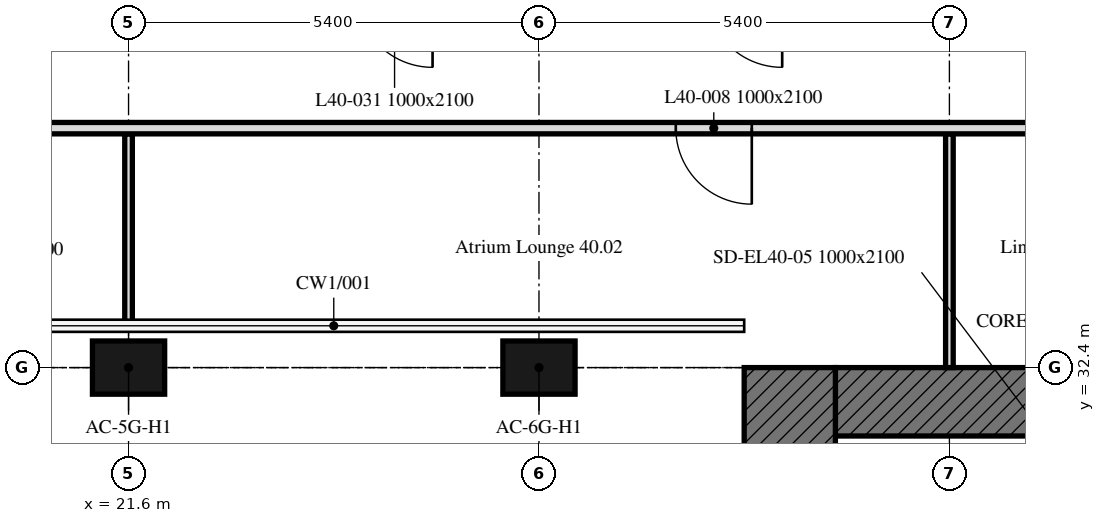
"""IFC4 building model, lengths in metres.
Left out: names, types, materials, properties, quantities, classifications, styles, units other than length and angle.
Written with IfcOpenShell. Run it as: python <this file> out.ifc"""

import sys

from ifc_helpers import new_model, si_unit, direction, frame, frame_2d, origin, origin_2d, place, context, subcontext, project, spatial, rectangle, extrude, element, fill, save


model = new_model("IFC4")
c1 = context("Model", 3, precision=1e-05, world=origin(), true_north=direction((0.0, 1.0)))
c2 = subcontext(c1, "Body", "Model", "MODEL_VIEW")
j1 = project(units=[si_unit("LENGTHUNIT", "METRE"), si_unit("PLANEANGLEUNIT", "RADIAN")], contexts=[c1])
p1 = place(None, origin())
s1 = spatial("IfcSite", under=j1, at=p1, CompositionType="ELEMENT")
p2 = place(p1, origin())
s2 = spatial("IfcBuilding", under=s1, at=p2, CompositionType="ELEMENT")
p3 = place(p2, frame((0.0, 0.0, 169.3)))
s3 = spatial("IfcBuildingStorey", under=s2, at=p3, CompositionType="ELEMENT", Elevation=169.3)
for number, where, z_axis, x_axis in (
    (1, (21.6, 32.4, 0.0), (0.0, 0.0, 1.0), (1.0, 0.0, 0.0)),
    (2, (27.0, 32.4, 0.0), (0.0, 0.0, 1.0), (1.0, 0.0, 0.0)),
):
    element("IfcColumn", number, at=place(p3, frame(where, z_axis=z_axis, x_axis=x_axis)), inside=s3, PredefinedType="COLUMN", context=c2, shape_type="SweptSolid", body=[
        extrude(rectangle(XDim=0.95, YDim=0.7, at=origin_2d()), origin(), (0.0, 0.0, 1.0), 3.0),
    ])
p4 = place(p3, frame((30.9, 31.95, 0.0), z_axis=(0.0, 0.0, 1.0), x_axis=(1.0, 0.0, 0.0)))
e3 = element("IfcWall", 3, at=p4, inside=s3, PredefinedType="SOLIDWALL", context=c2, shape_type="SweptSolid", body=[
    extrude(rectangle(XDim=11.1, YDim=0.9, at=frame_2d((5.55, 0.0))), origin(), (0.0, 0.0, 1.0), 3.0),
])
p5 = place(p4, frame((5.55, 0.0, 0.0)))
e4 = element("IfcOpeningElement", 4, at=p5, cuts=e3, PredefinedType="OPENING", context=c2, shape_type="SweptSolid", body=[
    extrude(rectangle(XDim=2.0, YDim=2.4, at=frame_2d((1.0, 1.2))), frame((0.0, 0.45, 0.0), z_axis=(0.0, -1.0, 0.0), x_axis=(1.0, 0.0, 0.0)), (0.0, 0.0, 1.0), 0.9),
])
p6 = place(p3, frame((30.3, 16.2, 0.0), z_axis=(0.0, 0.0, 1.0), x_axis=(0.0, 1.0, 0.0)))
e5 = element("IfcWall", 5, at=p6, inside=s3, PredefinedType="SOLIDWALL", context=c2, shape_type="SweptSolid", body=[
    extrude(rectangle(XDim=16.2, YDim=1.2, at=frame_2d((8.1, 0.0))), origin(), (0.0, 0.0, 1.0), 3.0),
])
p7 = place(p3, frame((21.6, 32.895, 0.0), z_axis=(0.0, 0.0, 1.0), x_axis=(0.0, 1.0, 0.0)))
e6 = element("IfcWall", 6, at=p7, inside=s3, PredefinedType="PARTITIONING", context=c2, shape_type="SweptSolid", body=[
    extrude(rectangle(XDim=2.58, YDim=0.1, at=frame_2d((1.29, 0.0))), origin(), (0.0, 0.0, 1.0), 3.0),
])
p8 = place(p3, frame((32.4, 32.4, 0.0), z_axis=(0.0, 0.0, 1.0), x_axis=(0.0, 1.0, 0.0)))
e7 = element("IfcWall", 7, at=p8, inside=s3, PredefinedType="PARTITIONING", context=c2, shape_type="SweptSolid", body=[
    extrude(rectangle(XDim=3.075, YDim=0.1, at=frame_2d((1.538, 0.0))), origin(), (0.0, 0.0, 1.0), 3.0),
])
p9 = place(p3, frame((43.275, 35.55, 0.0), z_axis=(0.0, 0.0, 1.0), x_axis=(-1.0, 0.0, 0.0)))
e8 = element("IfcWall", 8, at=p9, inside=s3, PredefinedType="PARTITIONING", context=c2, shape_type="SweptSolid", body=[
    extrude(rectangle(XDim=33.825, YDim=0.15, at=frame_2d((16.913, 0.0))), origin(), (0.0, 0.0, 1.0), 3.0),
])
p10 = place(p9, frame((23.875, 0.0, 0.0)))
e9 = element("IfcOpeningElement", 9, at=p10, cuts=e8, PredefinedType="OPENING", context=c2, shape_type="SweptSolid", body=[
    extrude(rectangle(XDim=1.0, YDim=2.1, at=frame_2d((0.5, 1.05))), frame((0.0, 0.075, 0.0), z_axis=(0.0, -1.0, 0.0), x_axis=(1.0, 0.0, 0.0)), (0.0, 0.0, 1.0), 0.15),
])
p11 = place(p9, frame((13.475, 0.0, 0.0)))
e10 = element("IfcOpeningElement", 10, at=p11, cuts=e8, PredefinedType="OPENING", context=c2, shape_type="SweptSolid", body=[
    extrude(rectangle(XDim=1.0, YDim=2.1, at=frame_2d((0.5, 1.05))), frame((0.0, 0.075, 0.0), z_axis=(0.0, -1.0, 0.0), x_axis=(1.0, 0.0, 0.0)), (0.0, 0.0, 1.0), 0.15),
])
p12 = place(p9, frame((8.337, 0.0, 0.0)))
e11 = element("IfcOpeningElement", 11, at=p12, cuts=e8, PredefinedType="OPENING", context=c2, shape_type="SweptSolid", body=[
    extrude(rectangle(XDim=1.0, YDim=2.1, at=frame_2d((0.5, 1.05))), frame((0.0, 0.075, 0.0), z_axis=(0.0, -1.0, 0.0), x_axis=(1.0, 0.0, 0.0)), (0.0, 0.0, 1.0), 0.15),
])
p13 = place(p9, frame((1.648, 0.0, 0.0)))
e12 = element("IfcOpeningElement", 12, at=p13, cuts=e8, PredefinedType="OPENING", context=c2, shape_type="SweptSolid", body=[
    extrude(rectangle(XDim=1.0, YDim=2.1, at=frame_2d((0.5, 1.05))), frame((0.0, 0.075, 0.0), z_axis=(0.0, -1.0, 0.0), x_axis=(1.0, 0.0, 0.0)), (0.0, 0.0, 1.0), 0.15),
])
p14 = place(p9, frame((28.613, 0.0, 0.0)))
e13 = element("IfcOpeningElement", 13, at=p14, cuts=e8, PredefinedType="OPENING", context=c2, shape_type="SweptSolid", body=[
    extrude(rectangle(XDim=1.0, YDim=2.1, at=frame_2d((0.5, 1.05))), frame((0.0, 0.075, 0.0), z_axis=(0.0, -1.0, 0.0), x_axis=(1.0, 0.0, 0.0)), (0.0, 0.0, 1.0), 0.15),
])
p15 = place(p9, frame((30.625, 0.0, 0.0)))
e14 = element("IfcOpeningElement", 14, at=p15, cuts=e8, PredefinedType="OPENING", context=c2, shape_type="SweptSolid", body=[
    extrude(rectangle(XDim=1.8, YDim=2.4, at=frame_2d((0.9, 1.2))), frame((0.0, 0.075, 0.0), z_axis=(0.0, -1.0, 0.0), x_axis=(1.0, 0.0, 0.0)), (0.0, 0.0, 1.0), 0.15),
])
p16 = place(p9, frame((5.525, 0.0, 0.0)))
e15 = element("IfcOpeningElement", 15, at=p16, cuts=e8, PredefinedType="OPENING", context=c2, shape_type="SweptSolid", body=[
    extrude(rectangle(XDim=1.8, YDim=2.4, at=frame_2d((0.9, 1.2))), frame((0.0, 0.075, 0.0), z_axis=(0.0, -1.0, 0.0), x_axis=(1.0, 0.0, 0.0)), (0.0, 0.0, 1.0), 0.15),
])
p17 = place(p11, origin())
e16 = element("IfcDoor", 16, at=p17, inside=s3, OperationType="SINGLE_SWING_LEFT", PredefinedType="DOOR", context=c2, shape_type="SweptSolid", body=[
    extrude(rectangle(XDim=1.0, YDim=2.1, at=frame_2d((0.5, 1.05))), frame((0.0, 0.025, 0.0), z_axis=(0.0, -1.0, 0.0), x_axis=(1.0, 0.0, 0.0)), (0.0, 0.0, 1.0), 0.05),
])
fill(e10, e16)
save(model, sys.argv[1])
